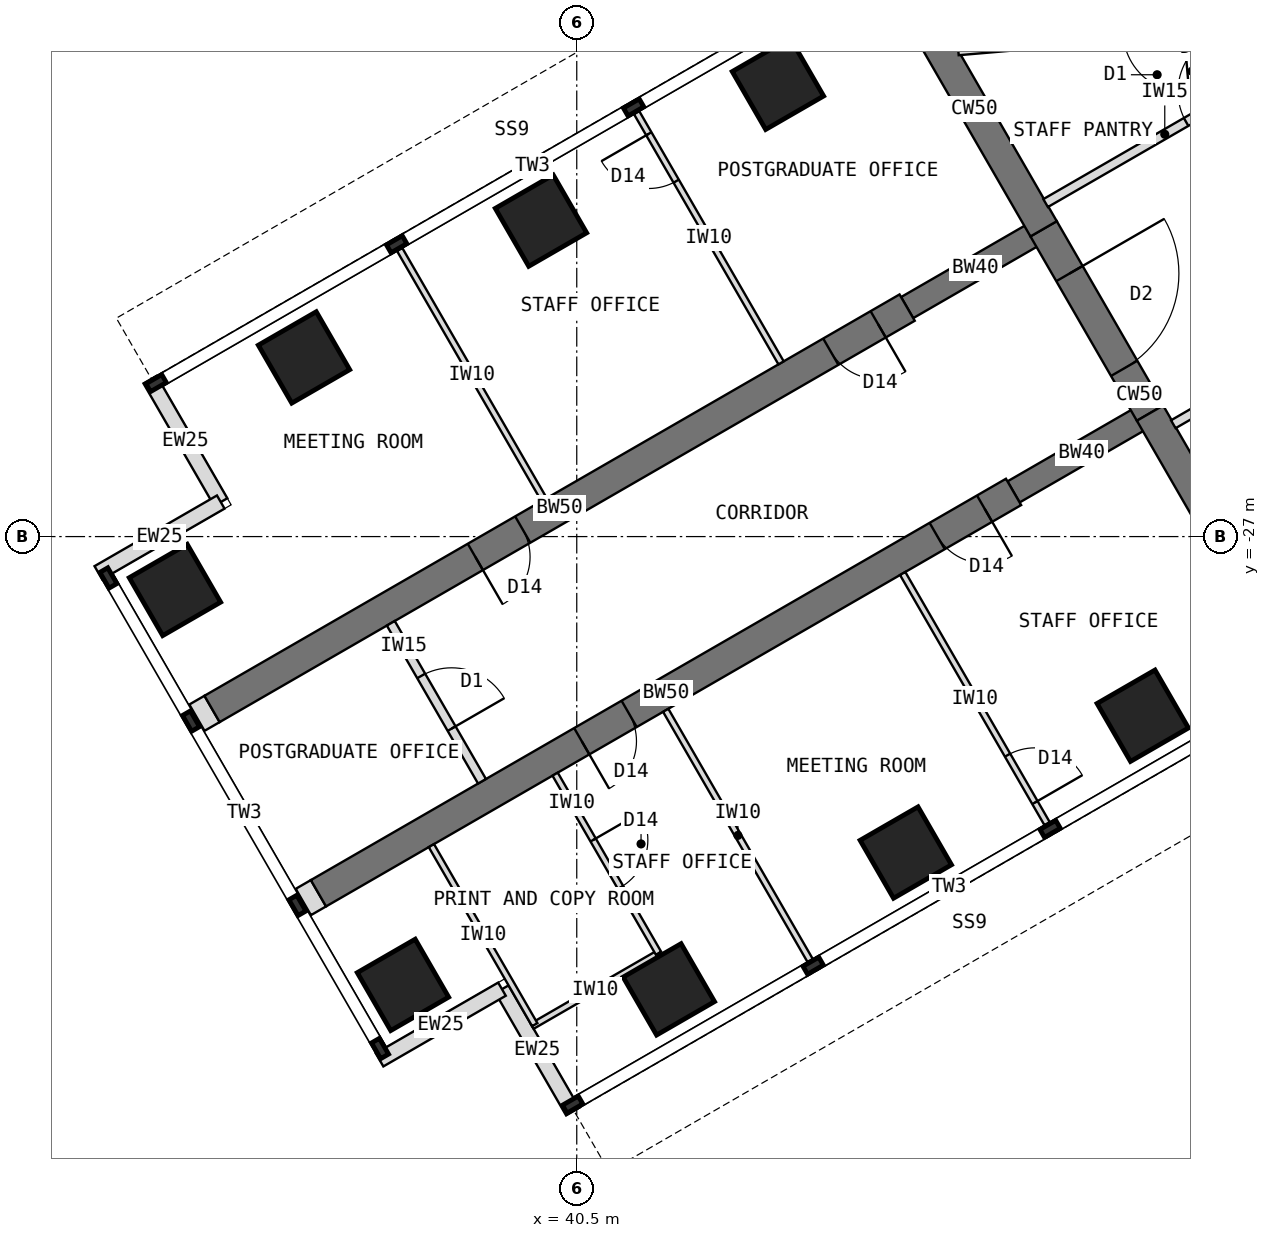
"""IFC4 building model, lengths in metres.
Left out: names, types, materials, properties, quantities, classifications, styles, units other than length and angle.
Written with IfcOpenShell. Run it as: python <this file> out.ifc"""

import sys

from ifc_helpers import new_model, si_unit, direction, frame, frame_2d, origin, origin_2d, place, context, subcontext, project, spatial, rectangle, extrude, element, fill, save


model = new_model("IFC4")
c1 = context("Model", 3, precision=1e-05, world=origin(), true_north=direction((0.0, 1.0)))
c2 = subcontext(c1, "Body", "Model", "MODEL_VIEW")
j1 = project(units=[si_unit("LENGTHUNIT", "METRE"), si_unit("PLANEANGLEUNIT", "RADIAN")], contexts=[c1])
p1 = place(None, origin())
s1 = spatial("IfcSite", under=j1, at=p1, CompositionType="ELEMENT")
p2 = place(p1, origin())
s2 = spatial("IfcBuilding", under=s1, at=p2, CompositionType="ELEMENT")
p3 = place(p2, frame((0.0, 0.0, 234.5)))
s3 = spatial("IfcBuildingStorey", under=s2, at=p3, CompositionType="ELEMENT", Elevation=234.5)
p4 = place(p3, frame((45.904, -18.0, 0.0), z_axis=(0.0, 0.0, 1.0), x_axis=(0.500024481964, -0.866011268655, 0.0)))
e1 = element("IfcWall", 1, at=p4, inside=s3, PredefinedType="SHEAR", context=c2, shape_type="SweptSolid", body=[
    extrude(rectangle(XDim=4.548, YDim=0.5, at=frame_2d((2.274, 0.0))), origin(), (0.0, 0.0, 1.0), 4.0),
])
p5 = place(p3, frame((48.178, -21.939, 0.0), z_axis=(0.0, 0.0, 1.0), x_axis=(0.500010275428, -0.866019471182, 0.0)))
e2 = element("IfcWall", 2, at=p5, inside=s3, PredefinedType="SHEAR", context=c2, shape_type="SweptSolid", body=[
    extrude(rectangle(XDim=3.5, YDim=0.5, at=frame_2d((1.75, 0.0))), origin(), (0.0, 0.0, 1.0), 4.0),
])
p6 = place(p5, frame((0.85, 0.0, 0.0)))
e3 = element("IfcOpeningElement", 3, at=p6, cuts=e2, PredefinedType="OPENING", context=c2, shape_type="SweptSolid", body=[
    extrude(rectangle(XDim=1.8, YDim=2.1, at=frame_2d((0.9, 1.05))), frame((0.0, 0.26, 0.0), z_axis=(0.0, -1.0, 0.0), x_axis=(1.0, 0.0, 0.0)), (0.0, 0.0, 1.0), 0.52),
])
p7 = place(p3, frame((49.928, -24.97, 0.0), z_axis=(0.0, 0.0, 1.0), x_axis=(0.499984222037, -0.866034513004, 0.0)))
e4 = element("IfcWall", 4, at=p7, inside=s3, PredefinedType="SHEAR", context=c2, shape_type="SweptSolid", body=[
    extrude(rectangle(XDim=4.548, YDim=0.5, at=frame_2d((2.274, 0.0))), origin(), (0.0, 0.0, 1.0), 4.0),
])
p8 = place(p3, frame((49.928, -24.97, 0.0), z_axis=(0.0, 0.0, 1.0), x_axis=(-0.866031863473, -0.499988811324, 0.0)))
e5 = element("IfcWall", 5, at=p8, inside=s3, PredefinedType="SHEAR", context=c2, shape_type="SweptSolid", body=[
    extrude(rectangle(XDim=2.592, YDim=0.4, at=frame_2d((1.296, 0.0))), origin(), (0.0, 0.0, 1.0), 4.0),
])
p9 = place(p3, frame((47.684, -26.266, 0.0), z_axis=(0.0, 0.0, 1.0), x_axis=(-0.866027579429, -0.499996231654, 0.0)))
e6 = element("IfcWall", 6, at=p9, inside=s3, PredefinedType="SHEAR", context=c2, shape_type="SweptSolid", body=[
    extrude(rectangle(XDim=13.2, YDim=0.5, at=frame_2d((6.6, 0.0))), origin(), (0.0, 0.0, 1.0), 4.0),
])
p10 = place(p9, frame((0.55, 0.0, 0.0)))
e7 = element("IfcOpeningElement", 7, at=p10, cuts=e6, PredefinedType="OPENING", context=c2, shape_type="SweptSolid", body=[
    extrude(rectangle(XDim=0.9, YDim=2.1, at=frame_2d((0.45, 1.05))), frame((0.0, 0.26, 0.0), z_axis=(0.0, -1.0, 0.0), x_axis=(1.0, 0.0, 0.0)), (0.0, 0.0, 1.0), 0.52),
])
p11 = place(p9, frame((7.3, 0.0, 0.0)))
e8 = element("IfcOpeningElement", 8, at=p11, cuts=e6, PredefinedType="OPENING", context=c2, shape_type="SweptSolid", body=[
    extrude(rectangle(XDim=0.9, YDim=2.1, at=frame_2d((0.45, 1.05))), frame((0.0, 0.26, 0.0), z_axis=(0.0, -1.0, 0.0), x_axis=(1.0, 0.0, 0.0)), (0.0, 0.0, 1.0), 0.52),
])
p12 = place(p3, frame((48.178, -21.939, 0.0), z_axis=(0.0, 0.0, 1.0), x_axis=(-0.866072649678, -0.499918158782, 0.0)))
e9 = element("IfcWall", 9, at=p12, inside=s3, PredefinedType="SHEAR", context=c2, shape_type="SweptSolid", body=[
    extrude(rectangle(XDim=2.592, YDim=0.4, at=frame_2d((1.296, 0.0))), origin(), (0.0, 0.0, 1.0), 4.0),
])
p13 = place(p3, frame((45.934, -23.234, 0.0), z_axis=(0.0, 0.0, 1.0), x_axis=(-0.866019570528, -0.500010103361, 0.0)))
e10 = element("IfcWall", 10, at=p13, inside=s3, PredefinedType="SHEAR", context=c2, shape_type="SweptSolid", body=[
    extrude(rectangle(XDim=13.2, YDim=0.5, at=frame_2d((6.6, 0.0))), origin(), (0.0, 0.0, 1.0), 4.0),
])
p14 = place(p13, frame((0.55, 0.0, 0.0)))
e11 = element("IfcOpeningElement", 11, at=p14, cuts=e10, PredefinedType="OPENING", context=c2, shape_type="SweptSolid", body=[
    extrude(rectangle(XDim=0.9, YDim=2.1, at=frame_2d((0.45, 1.05))), frame((0.0, 0.26, 0.0), z_axis=(0.0, -1.0, 0.0), x_axis=(1.0, 0.0, 0.0)), (0.0, 0.0, 1.0), 0.52),
])
p15 = place(p13, frame((7.3, 0.0, 0.0)))
e12 = element("IfcOpeningElement", 12, at=p15, cuts=e10, PredefinedType="OPENING", context=c2, shape_type="SweptSolid", body=[
    extrude(rectangle(XDim=0.9, YDim=2.1, at=frame_2d((0.45, 1.05))), frame((0.0, 0.26, 0.0), z_axis=(0.0, -1.0, 0.0), x_axis=(1.0, 0.0, 0.0)), (0.0, 0.0, 1.0), 0.52),
])
for number, where, z_axis, x_axis in (
    (13, (49.809, -29.946, 0.0), (0.0, 0.0, 1.0), (0.866, 0.5, 0.0)),
    (14, (43.809, -19.554, 0.0), (0.0, 0.0, 1.0), (0.866, 0.5, 0.0)),
    (15, (45.912, -32.196, 0.0), (0.0, 0.0, 1.0), (0.866, 0.5, 0.0)),
    (16, (39.912, -21.804, 0.0), (0.0, 0.0, 1.0), (0.866, 0.5, 0.0)),
    (17, (42.014, -34.446, 0.0), (0.0, 0.0, 1.0), (0.866, 0.5, 0.0)),
    (18, (36.014, -24.054, 0.0), (0.0, 0.0, 1.0), (0.866, 0.5, 0.0)),
    (19, (37.642, -34.373, 0.0), (0.0, 0.0, 1.0), (0.866, 0.5, 0.0)),
    (20, (33.892, -27.877, 0.0), (0.0, 0.0, 1.0), (0.866, 0.5, 0.0)),
):
    element("IfcColumn", number, at=place(p3, frame(where, z_axis=z_axis, x_axis=x_axis)), inside=s3, PredefinedType="COLUMN", context=c2, shape_type="SweptSolid", body=[
        extrude(rectangle(XDim=1.1, YDim=1.1, at=origin_2d()), origin(), (0.0, 0.0, 1.0), 4.0),
    ])
for number, where, z_axis, x_axis in (
    (21, (40.433, -36.456, 0.0), (0.0, 0.0, 1.0), (-0.5, 0.866, 0.0)),
    (22, (39.27, -34.443, 0.0), (0.0, 0.0, 1.0), (-0.866, -0.5, 0.0)),
    (23, (33.483, -24.419, 0.0), (0.0, 0.0, 1.0), (0.5, -0.866, 0.0)),
    (24, (34.645, -26.432, 0.0), (0.0, 0.0, 1.0), (-0.866, -0.5, 0.0)),
):
    element("IfcWall", number, at=place(p3, frame(where, z_axis=z_axis, x_axis=x_axis)), inside=s3, PredefinedType="STANDARD", context=c2, shape_type="SweptSolid", body=[
        extrude(rectangle(XDim=2.325, YDim=0.25, at=frame_2d((1.163, 0.0))), origin(), (0.0, 0.0, 1.0), 3.7),
    ])
for number, where, z_axis, x_axis in (
    (25, (36.252, -32.865, 0.0), (0.0, 0.0, 1.0), (-0.866, -0.5, 0.0)),
    (26, (34.502, -29.834, 0.0), (0.0, 0.0, 1.0), (-0.866, -0.5, 0.0)),
):
    element("IfcWall", number, at=place(p3, frame(where, z_axis=z_axis, x_axis=x_axis)), inside=s3, PredefinedType="PARTITIONING", context=c2, shape_type="SweptSolid", body=[
        extrude(rectangle(XDim=0.288, YDim=0.5, at=frame_2d((0.144, 0.0))), origin(), (0.0, 0.0, 1.0), 3.7),
    ])
p16 = place(p3, frame((52.38, -19.201, 0.0), z_axis=(0.0, 0.0, 1.0), x_axis=(-0.866012946976, 0.500021575205, 0.0)))
e27 = element("IfcWall", 27, at=p16, inside=s3, PredefinedType="SHEAR", context=c2, shape_type="SweptSolid", body=[
    extrude(rectangle(XDim=5.958, YDim=0.4, at=frame_2d((2.979, 0.0))), origin(), (0.0, 0.0, 1.0), 4.0),
])
p17 = place(p3, frame((45.86, -27.607, 0.0), z_axis=(0.0, 0.0, 1.0), x_axis=(0.499986429846, -0.866033238375, 0.0)))
e28 = element("IfcWall", 28, at=p17, inside=s3, PredefinedType="PARTITIONING", context=c2, shape_type="SweptSolid", body=[
    extrude(rectangle(XDim=4.75, YDim=0.1, at=frame_2d((2.375, 0.0))), origin(), (0.0, 0.0, 1.0), 3.7),
])
p18 = place(p17, frame((3.45, 0.0, 0.0)))
e29 = element("IfcOpeningElement", 29, at=p18, cuts=e28, PredefinedType="OPENING", context=c2, shape_type="SweptSolid", body=[
    extrude(rectangle(XDim=0.9, YDim=2.1, at=frame_2d((0.45, 1.05))), frame((0.0, 0.06, 0.0), z_axis=(0.0, -1.0, 0.0), x_axis=(1.0, 0.0, 0.0)), (0.0, 0.0, 1.0), 0.12),
])
p19 = place(p3, frame((41.963, -29.857, 0.0), z_axis=(0.0, 0.0, 1.0), x_axis=(0.499986429846, -0.866033238375, 0.0)))
e30 = element("IfcWall", 30, at=p19, inside=s3, PredefinedType="PARTITIONING", context=c2, shape_type="SweptSolid", body=[
    extrude(rectangle(XDim=4.75, YDim=0.1, at=frame_2d((2.375, 0.0))), origin(), (0.0, 0.0, 1.0), 3.7),
])
p20 = place(p3, frame((41.844, -33.852, 0.0), z_axis=(0.0, 0.0, 1.0), x_axis=(-0.866024647952, -0.500001309137, 0.0)))
e31 = element("IfcWall", 31, at=p20, inside=s3, PredefinedType="PARTITIONING", context=c2, shape_type="SweptSolid", body=[
    extrude(rectangle(XDim=2.4, YDim=0.1, at=frame_2d((1.2, 0.0))), origin(), (0.0, 0.0, 1.0), 3.7),
])
p21 = place(p3, frame((40.144, -30.907, 0.0), z_axis=(0.0, 0.0, 1.0), x_axis=(0.499977295307, -0.866038511948, 0.0)))
e32 = element("IfcWall", 32, at=p21, inside=s3, PredefinedType="PARTITIONING", context=c2, shape_type="SweptSolid", body=[
    extrude(rectangle(XDim=3.4, YDim=0.1, at=frame_2d((1.7, 0.0))), origin(), (0.0, 0.0, 1.0), 3.7),
])
p22 = place(p21, frame((1.25, 0.0, 0.0)))
e33 = element("IfcOpeningElement", 33, at=p22, cuts=e32, PredefinedType="OPENING", context=c2, shape_type="SweptSolid", body=[
    extrude(rectangle(XDim=0.9, YDim=2.1, at=frame_2d((0.45, 1.05))), frame((0.0, 0.06, 0.0), z_axis=(0.0, -1.0, 0.0), x_axis=(1.0, 0.0, 0.0)), (0.0, 0.0, 1.0), 0.12),
])
p23 = place(p3, frame((38.109, -32.082, 0.0), z_axis=(0.0, 0.0, 1.0), x_axis=(0.499977295307, -0.866038511948, 0.0)))
e34 = element("IfcWall", 34, at=p23, inside=s3, PredefinedType="PARTITIONING", context=c2, shape_type="SweptSolid", body=[
    extrude(rectangle(XDim=3.4, YDim=0.1, at=frame_2d((1.7, 0.0))), origin(), (0.0, 0.0, 1.0), 3.7),
])
p24 = place(p3, frame((43.86, -24.143, 0.0), z_axis=(0.0, 0.0, 1.0), x_axis=(-0.499986429846, 0.866033238375, 0.0)))
e35 = element("IfcWall", 35, at=p24, inside=s3, PredefinedType="PARTITIONING", context=c2, shape_type="SweptSolid", body=[
    extrude(rectangle(XDim=4.75, YDim=0.1, at=frame_2d((2.375, 0.0))), origin(), (0.0, 0.0, 1.0), 3.7),
])
p25 = place(p24, frame((3.45, 0.0, 0.0)))
e36 = element("IfcOpeningElement", 36, at=p25, cuts=e35, PredefinedType="OPENING", context=c2, shape_type="SweptSolid", body=[
    extrude(rectangle(XDim=0.9, YDim=2.1, at=frame_2d((0.45, 1.05))), frame((0.0, 0.06, 0.0), z_axis=(0.0, -1.0, 0.0), x_axis=(1.0, 0.0, 0.0)), (0.0, 0.0, 1.0), 0.12),
])
p26 = place(p3, frame((39.963, -26.393, 0.0), z_axis=(0.0, 0.0, 1.0), x_axis=(-0.499986429846, 0.866033238375, 0.0)))
e37 = element("IfcWall", 37, at=p26, inside=s3, PredefinedType="PARTITIONING", context=c2, shape_type="SweptSolid", body=[
    extrude(rectangle(XDim=4.75, YDim=0.1, at=frame_2d((2.375, 0.0))), origin(), (0.0, 0.0, 1.0), 3.7),
])
p27 = place(p3, frame((54.23, -22.89, 0.0), z_axis=(0.0, 0.0, 1.0), x_axis=(-0.866006805923, -0.500032211057, 0.0)))
e38 = element("IfcWall", 38, at=p27, inside=s3, PredefinedType="PARTITIONING", context=c2, shape_type="SweptSolid", body=[
    extrude(rectangle(XDim=4.526, YDim=0.15, at=frame_2d((2.263, 0.0))), origin(), (0.0, 0.0, 1.0), 3.7),
])
p28 = place(p27, frame((0.858, 0.0, 0.0)))
e39 = element("IfcOpeningElement", 39, at=p28, cuts=e38, PredefinedType="OPENING", context=c2, shape_type="SweptSolid", body=[
    extrude(rectangle(XDim=1.0, YDim=2.1, at=frame_2d((0.5, 1.05))), frame((0.0, 0.085, 0.0), z_axis=(0.0, -1.0, 0.0), x_axis=(1.0, 0.0, 0.0)), (0.0, 0.0, 1.0), 0.17),
])
p29 = place(p3, frame((48.211, -21.515, 0.0), z_axis=(0.0, 0.0, 1.0), x_axis=(0.866043651885, 0.499968392031, 0.0)))
e40 = element("IfcWall", 40, at=p29, inside=s3, PredefinedType="PARTITIONING", context=c2, shape_type="SweptSolid", body=[
    extrude(rectangle(XDim=4.526, YDim=0.15, at=frame_2d((2.263, 0.0))), origin(), (0.0, 0.0, 1.0), 3.7),
])
p30 = place(p29, frame((2.668, 0.0, 0.0)))
e41 = element("IfcOpeningElement", 41, at=p30, cuts=e40, PredefinedType="OPENING", context=c2, shape_type="SweptSolid", body=[
    extrude(rectangle(XDim=1.0, YDim=2.1, at=frame_2d((0.5, 1.05))), frame((0.0, 0.085, 0.0), z_axis=(0.0, -1.0, 0.0), x_axis=(1.0, 0.0, 0.0)), (0.0, 0.0, 1.0), 0.17),
])
p31 = place(p3, frame((51.364, -18.614, 0.0), z_axis=(0.0, 0.0, 1.0), x_axis=(-0.996314617181, -0.085774026317, 0.0)))
e42 = element("IfcWall", 42, at=p31, inside=s3, PredefinedType="PARTITIONING", context=c2, shape_type="SweptSolid", body=[
    extrude(rectangle(XDim=4.605, YDim=0.15, at=frame_2d((2.303, 0.0))), origin(), (0.0, 0.0, 1.0), 3.7),
])
p32 = place(p31, frame((0.882, 0.0, 0.0)))
e43 = element("IfcOpeningElement", 43, at=p32, cuts=e42, PredefinedType="OPENING", context=c2, shape_type="SweptSolid", body=[
    extrude(rectangle(XDim=1.0, YDim=2.1, at=frame_2d((0.5, 1.05))), frame((0.0, 0.085, 0.0), z_axis=(0.0, -1.0, 0.0), x_axis=(1.0, 0.0, 0.0)), (0.0, 0.0, 1.0), 0.17),
])
p33 = place(p3, frame((37.442, -28.426, 0.0), z_axis=(0.0, 0.0, 1.0), x_axis=(0.50002537861, -0.866010750942, 0.0)))
e44 = element("IfcWall", 44, at=p33, inside=s3, PredefinedType="PARTITIONING", context=c2, shape_type="SweptSolid", body=[
    extrude(rectangle(XDim=3.0, YDim=0.15, at=frame_2d((1.5, 0.0))), origin(), (0.0, 0.0, 1.0), 3.7),
])
p34 = place(p33, frame((1.0, 0.0, 0.0)))
e45 = element("IfcOpeningElement", 45, at=p34, cuts=e44, PredefinedType="OPENING", context=c2, shape_type="SweptSolid", body=[
    extrude(rectangle(XDim=1.0, YDim=2.1, at=frame_2d((0.5, 1.05))), frame((0.0, 0.085, 0.0), z_axis=(0.0, -1.0, 0.0), x_axis=(1.0, 0.0, 0.0)), (0.0, 0.0, 1.0), 0.17),
])
p35 = place(p6, origin())
e46 = element("IfcDoor", 46, at=p35, inside=s3, OperationType="DOUBLE_DOOR_DOUBLE_SWING", PredefinedType="DOOR", context=c2, shape_type="SweptSolid", body=[
    extrude(rectangle(XDim=1.8, YDim=2.1, at=frame_2d((0.9, 1.05))), frame((0.0, 0.025, 0.0), z_axis=(0.0, -1.0, 0.0), x_axis=(1.0, 0.0, 0.0)), (0.0, 0.0, 1.0), 0.05),
])
fill(e3, e46)
p36 = place(p18, origin())
e47 = element("IfcDoor", 47, at=p36, inside=s3, OperationType="SINGLE_SWING_RIGHT", PredefinedType="DOOR", context=c2, shape_type="SweptSolid", body=[
    extrude(rectangle(XDim=0.9, YDim=2.1, at=frame_2d((0.45, 1.05))), frame((0.0, 0.025, 0.0), z_axis=(0.0, -1.0, 0.0), x_axis=(1.0, 0.0, 0.0)), (0.0, 0.0, 1.0), 0.05),
])
fill(e29, e47)
p37 = place(p22, origin())
e48 = element("IfcDoor", 48, at=p37, inside=s3, OperationType="SINGLE_SWING_LEFT", PredefinedType="DOOR", context=c2, shape_type="SweptSolid", body=[
    extrude(rectangle(XDim=0.9, YDim=2.1, at=frame_2d((0.45, 1.05))), frame((0.0, 0.025, 0.0), z_axis=(0.0, -1.0, 0.0), x_axis=(1.0, 0.0, 0.0)), (0.0, 0.0, 1.0), 0.05),
])
fill(e33, e48)
p38 = place(p25, origin())
e49 = element("IfcDoor", 49, at=p38, inside=s3, OperationType="SINGLE_SWING_RIGHT", PredefinedType="DOOR", context=c2, shape_type="SweptSolid", body=[
    extrude(rectangle(XDim=0.9, YDim=2.1, at=frame_2d((0.45, 1.05))), frame((0.0, 0.025, 0.0), z_axis=(0.0, -1.0, 0.0), x_axis=(1.0, 0.0, 0.0)), (0.0, 0.0, 1.0), 0.05),
])
fill(e36, e49)
p39 = place(p30, origin())
e50 = element("IfcDoor", 50, at=p39, inside=s3, OperationType="SINGLE_SWING_RIGHT", PredefinedType="DOOR", context=c2, shape_type="SweptSolid", body=[
    extrude(rectangle(XDim=1.0, YDim=2.1, at=frame_2d((0.5, 1.05))), frame((0.0, 0.025, 0.0), z_axis=(0.0, -1.0, 0.0), x_axis=(1.0, 0.0, 0.0)), (0.0, 0.0, 1.0), 0.05),
])
fill(e41, e50)
p40 = place(p34, origin())
e51 = element("IfcDoor", 51, at=p40, inside=s3, OperationType="SINGLE_SWING_RIGHT", PredefinedType="DOOR", context=c2, shape_type="SweptSolid", body=[
    extrude(rectangle(XDim=1.0, YDim=2.1, at=frame_2d((0.5, 1.05))), frame((0.0, 0.025, 0.0), z_axis=(0.0, -1.0, 0.0), x_axis=(1.0, 0.0, 0.0)), (0.0, 0.0, 1.0), 0.05),
])
fill(e45, e51)
p41 = place(p10, origin())
e52 = element("IfcDoor", 52, at=p41, inside=s3, OperationType="SINGLE_SWING_LEFT", PredefinedType="DOOR", context=c2, shape_type="SweptSolid", body=[
    extrude(rectangle(XDim=0.9, YDim=2.1, at=frame_2d((0.45, 1.05))), frame((0.0, 0.025, 0.0), z_axis=(0.0, -1.0, 0.0), x_axis=(1.0, 0.0, 0.0)), (0.0, 0.0, 1.0), 0.05),
])
fill(e7, e52)
p42 = place(p11, origin())
e53 = element("IfcDoor", 53, at=p42, inside=s3, OperationType="SINGLE_SWING_RIGHT", PredefinedType="DOOR", context=c2, shape_type="SweptSolid", body=[
    extrude(rectangle(XDim=0.9, YDim=2.1, at=frame_2d((0.45, 1.05))), frame((0.0, 0.025, 0.0), z_axis=(0.0, -1.0, 0.0), x_axis=(1.0, 0.0, 0.0)), (0.0, 0.0, 1.0), 0.05),
])
fill(e8, e53)
p43 = place(p14, origin())
e54 = element("IfcDoor", 54, at=p43, inside=s3, OperationType="SINGLE_SWING_LEFT", PredefinedType="DOOR", context=c2, shape_type="SweptSolid", body=[
    extrude(rectangle(XDim=0.9, YDim=2.1, at=frame_2d((0.45, 1.05))), frame((0.0, 0.025, 0.0), z_axis=(0.0, -1.0, 0.0), x_axis=(1.0, 0.0, 0.0)), (0.0, 0.0, 1.0), 0.05),
])
fill(e11, e54)
p44 = place(p15, origin())
e55 = element("IfcDoor", 55, at=p44, inside=s3, OperationType="SINGLE_SWING_RIGHT", PredefinedType="DOOR", context=c2, shape_type="SweptSolid", body=[
    extrude(rectangle(XDim=0.9, YDim=2.1, at=frame_2d((0.45, 1.05))), frame((0.0, 0.025, 0.0), z_axis=(0.0, -1.0, 0.0), x_axis=(1.0, 0.0, 0.0)), (0.0, 0.0, 1.0), 0.05),
])
fill(e12, e55)
save(model, sys.argv[1])
